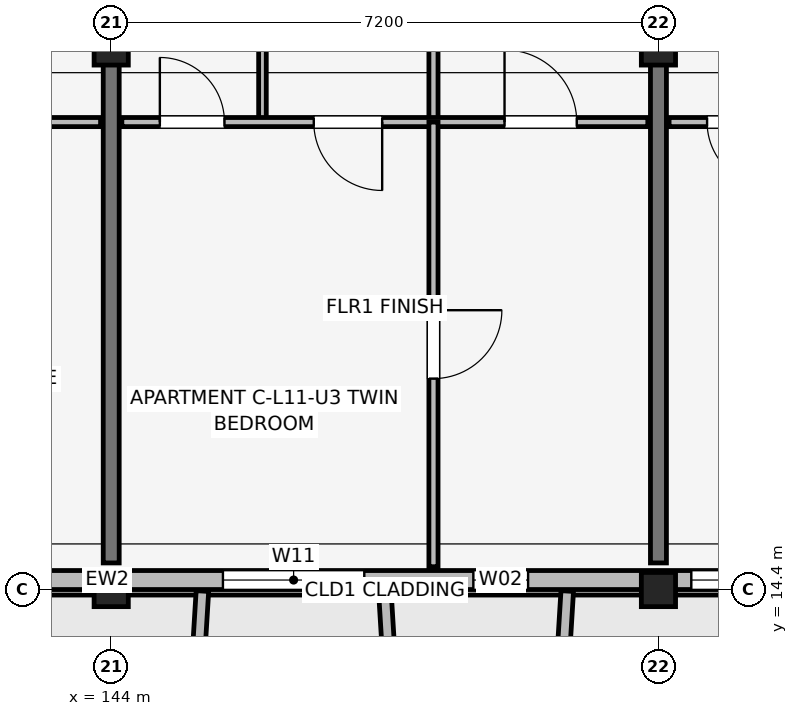
"""IFC4 building model, lengths in metres.
Left out: names, types, materials, properties, quantities, classifications, styles, units other than length and angle.
Written with IfcOpenShell. Run it as: python <this file> out.ifc"""

import sys

from ifc_helpers import new_model, si_unit, direction, frame, frame_2d, origin, origin_2d, place, context, subcontext, project, spatial, rectangle, extrude, element, fill, save


model = new_model("IFC4")
c1 = context("Model", 3, precision=1e-05, world=origin(), true_north=direction((0.0, 1.0)))
c2 = subcontext(c1, "Body", "Model", "MODEL_VIEW")
j1 = project(units=[si_unit("LENGTHUNIT", "METRE"), si_unit("PLANEANGLEUNIT", "RADIAN")], contexts=[c1])
p1 = place(None, origin())
s1 = spatial("IfcSite", under=j1, at=p1, CompositionType="ELEMENT")
p2 = place(p1, origin())
s2 = spatial("IfcBuilding", under=s1, at=p2, CompositionType="ELEMENT")
p3 = place(p2, frame((0.0, 0.0, 37.05)))
s3 = spatial("IfcBuildingStorey", under=s2, at=p3, CompositionType="ELEMENT", Elevation=37.05)
p4 = place(p3, frame((144.0, 14.4, 0.0), z_axis=(0.0, 0.0, 1.0), x_axis=(1.0, 0.0, 0.0)))
e1 = element("IfcColumn", 1, at=p4, inside=s3, PredefinedType="COLUMN", context=c2, shape_type="SweptSolid", body=[
    extrude(rectangle(XDim=0.45, YDim=0.45, at=origin_2d()), origin(), (0.0, 0.0, 1.0), 3.15),
])
p5 = place(p3, frame((144.0, 21.6, 0.0), z_axis=(0.0, 0.0, 1.0), x_axis=(1.0, 0.0, 0.0)))
e2 = element("IfcColumn", 2, at=p5, inside=s3, PredefinedType="COLUMN", context=c2, shape_type="SweptSolid", body=[
    extrude(rectangle(XDim=0.45, YDim=0.6, at=origin_2d()), origin(), (0.0, 0.0, 1.0), 3.15),
])
p6 = place(p3, frame((151.2, 14.4, 0.0), z_axis=(0.0, 0.0, 1.0), x_axis=(1.0, 0.0, 0.0)))
e3 = element("IfcColumn", 3, at=p6, inside=s3, PredefinedType="COLUMN", context=c2, shape_type="SweptSolid", body=[
    extrude(rectangle(XDim=0.45, YDim=0.45, at=origin_2d()), origin(), (0.0, 0.0, 1.0), 3.15),
])
p7 = place(p3, frame((151.2, 21.6, 0.0), z_axis=(0.0, 0.0, 1.0), x_axis=(1.0, 0.0, 0.0)))
e4 = element("IfcColumn", 4, at=p7, inside=s3, PredefinedType="COLUMN", context=c2, shape_type="SweptSolid", body=[
    extrude(rectangle(XDim=0.45, YDim=0.6, at=origin_2d()), origin(), (0.0, 0.0, 1.0), 3.15),
])
for number, where, z_axis, x_axis in (
    (5, (144.0, 14.75, 0.0), (0.0, 0.0, 1.0), (0.0, 1.0, 0.0)),
    (6, (151.2, 14.75, 0.0), (0.0, 0.0, 1.0), (0.0, 1.0, 0.0)),
):
    element("IfcWall", number, at=place(p3, frame(where, z_axis=z_axis, x_axis=x_axis)), inside=s3, PredefinedType="SHEAR", context=c2, shape_type="SweptSolid", body=[
        extrude(rectangle(XDim=9.4, YDim=0.21, at=frame_2d((4.7, 0.0))), origin(), (0.0, 0.0, 1.0), 3.15),
    ])
p8 = place(p3, frame((132.6, 14.525, 0.0), z_axis=(0.0, 0.0, 1.0), x_axis=(1.0, 0.0, 0.0)))
e7 = element("IfcWall", 7, at=p8, inside=s3, PredefinedType="SOLIDWALL", context=c2, shape_type="SweptSolid", body=[
    extrude(rectangle(XDim=30.0, YDim=0.25, at=frame_2d((15.0, 0.0))), origin(), (0.0, 0.0, 1.0), 2.45),
])
p9 = place(p8, frame((9.825, 0.0, 0.0), z_axis=(0.0, 0.0, 1.0), x_axis=(-1.0, 0.0, 0.0)))
e8 = element("IfcOpeningElement", 8, at=p9, cuts=e7, PredefinedType="OPENING", context=c2, shape_type="SweptSolid", body=[
    extrude(rectangle(XDim=1.65, YDim=2.15, at=frame_2d((0.825, 1.075))), frame((0.0, 0.135, 0.0), z_axis=(0.0, -1.0, 0.0), x_axis=(1.0, 0.0, 0.0)), (0.0, 0.0, 1.0), 0.27),
])
p10 = place(p8, frame((24.15, 0.0, 0.0), z_axis=(0.0, 0.0, 1.0), x_axis=(-1.0, 0.0, 0.0)))
e9 = element("IfcOpeningElement", 9, at=p10, cuts=e7, PredefinedType="OPENING", context=c2, shape_type="SweptSolid", body=[
    extrude(rectangle(XDim=1.5, YDim=2.15, at=frame_2d((0.75, 1.075))), frame((0.0, 0.135, 0.0), z_axis=(0.0, -1.0, 0.0), x_axis=(1.0, 0.0, 0.0)), (0.0, 0.0, 1.0), 0.27),
])
p11 = place(p8, frame((0.77, 0.0, 0.7)))
e10 = element("IfcOpeningElement", 10, at=p11, cuts=e7, PredefinedType="OPENING", context=c2, shape_type="SweptSolid", body=[
    extrude(rectangle(XDim=1.46, YDim=1.55, at=frame_2d((0.73, 0.775))), frame((0.0, 0.135, 0.0), z_axis=(0.0, -1.0, 0.0), x_axis=(1.0, 0.0, 0.0)), (0.0, 0.0, 1.0), 0.27),
])
p12 = place(p8, frame((3.167, 0.0, 0.75)))
e11 = element("IfcOpeningElement", 11, at=p12, cuts=e7, PredefinedType="OPENING", context=c2, shape_type="SweptSolid", body=[
    extrude(rectangle(XDim=0.6, YDim=1.25, at=frame_2d((0.3, 0.625))), frame((0.0, 0.135, 0.0), z_axis=(0.0, -1.0, 0.0), x_axis=(1.0, 0.0, 0.0)), (0.0, 0.0, 1.0), 0.27),
])
p13 = place(p8, frame((4.633, 0.0, 0.75)))
e12 = element("IfcOpeningElement", 12, at=p13, cuts=e7, PredefinedType="OPENING", context=c2, shape_type="SweptSolid", body=[
    extrude(rectangle(XDim=0.6, YDim=1.25, at=frame_2d((0.3, 0.625))), frame((0.0, 0.135, 0.0), z_axis=(0.0, -1.0, 0.0), x_axis=(1.0, 0.0, 0.0)), (0.0, 0.0, 1.0), 0.27),
])
p14 = place(p8, frame((12.87, 0.0, 0.7)))
e13 = element("IfcOpeningElement", 13, at=p14, cuts=e7, PredefinedType="OPENING", context=c2, shape_type="SweptSolid", body=[
    extrude(rectangle(XDim=1.86, YDim=1.6, at=frame_2d((0.93, 0.8))), frame((0.0, 0.135, 0.0), z_axis=(0.0, -1.0, 0.0), x_axis=(1.0, 0.0, 0.0)), (0.0, 0.0, 1.0), 0.27),
])
p15 = place(p8, frame((16.165, 0.0, 0.75)))
e14 = element("IfcOpeningElement", 14, at=p15, cuts=e7, PredefinedType="OPENING", context=c2, shape_type="SweptSolid", body=[
    extrude(rectangle(XDim=0.72, YDim=1.35, at=frame_2d((0.36, 0.675))), frame((0.0, 0.135, 0.0), z_axis=(0.0, -1.0, 0.0), x_axis=(1.0, 0.0, 0.0)), (0.0, 0.0, 1.0), 0.27),
])
p16 = place(p8, frame((19.032, 0.0, 0.75)))
e15 = element("IfcOpeningElement", 15, at=p16, cuts=e7, PredefinedType="OPENING", context=c2, shape_type="SweptSolid", body=[
    extrude(rectangle(XDim=0.6, YDim=1.25, at=frame_2d((0.3, 0.625))), frame((0.0, 0.135, 0.0), z_axis=(0.0, -1.0, 0.0), x_axis=(1.0, 0.0, 0.0)), (0.0, 0.0, 1.0), 0.27),
])
p17 = place(p8, frame((26.232, 0.0, 0.75)))
e16 = element("IfcOpeningElement", 16, at=p17, cuts=e7, PredefinedType="OPENING", context=c2, shape_type="SweptSolid", body=[
    extrude(rectangle(XDim=0.6, YDim=1.25, at=frame_2d((0.3, 0.625))), frame((0.0, 0.135, 0.0), z_axis=(0.0, -1.0, 0.0), x_axis=(1.0, 0.0, 0.0)), (0.0, 0.0, 1.0), 0.27),
])
p18 = place(p8, frame((28.05, 0.0, 0.75)))
e17 = element("IfcOpeningElement", 17, at=p18, cuts=e7, PredefinedType="OPENING", context=c2, shape_type="SweptSolid", body=[
    extrude(rectangle(XDim=1.1, YDim=1.5, at=frame_2d((0.55, 0.75))), frame((0.0, 0.135, 0.0), z_axis=(0.0, -1.0, 0.0), x_axis=(1.0, 0.0, 0.0)), (0.0, 0.0, 1.0), 0.27),
])
for number, where, z_axis, x_axis in (
    (18, (145.2, 14.38, 0.0), (0.0, 0.0, 1.0), (-0.061, -0.998, 0.0)),
    (19, (147.6, 14.38, 0.0), (0.0, 0.0, 1.0), (0.061, -0.998, 0.0)),
    (20, (150.0, 14.38, 0.0), (0.0, 0.0, 1.0), (-0.061, -0.998, 0.0)),
):
    element("IfcWall", number, at=place(p3, frame(where, z_axis=z_axis, x_axis=x_axis)), inside=s3, PredefinedType="ELEMENTEDWALL", context=c2, shape_type="SweptSolid", body=[
        extrude(rectangle(XDim=1.964, YDim=0.165, at=frame_2d((0.982, 0.0))), origin(), (0.0, 0.0, 1.0), 2.45),
    ])
p19 = place(p3, frame((136.94, 20.55, 0.0), z_axis=(0.0, 0.0, 1.0), x_axis=(1.0, 0.0, 0.0)))
e21 = element("IfcWall", 21, at=p19, inside=s3, PredefinedType="PARTITIONING", context=c2, shape_type="SweptSolid", body=[
    extrude(rectangle(XDim=6.92, YDim=0.12, at=frame_2d((3.46, 0.0))), origin(), (0.0, 0.0, 1.0), 2.38),
])
p20 = place(p19, frame((1.35, 0.0, 0.0), z_axis=(0.0, 0.0, 1.0), x_axis=(-1.0, 0.0, 0.0)))
e22 = element("IfcOpeningElement", 22, at=p20, cuts=e21, PredefinedType="OPENING", context=c2, shape_type="SweptSolid", body=[
    extrude(rectangle(XDim=0.85, YDim=2.08, at=frame_2d((0.425, 1.04))), frame((0.0, 0.07, 0.0), z_axis=(0.0, -1.0, 0.0), x_axis=(1.0, 0.0, 0.0)), (0.0, 0.0, 1.0), 0.14),
])
p21 = place(p19, frame((2.375, 0.0, 0.0)))
e23 = element("IfcOpeningElement", 23, at=p21, cuts=e21, PredefinedType="OPENING", context=c2, shape_type="SweptSolid", body=[
    extrude(rectangle(XDim=0.9, YDim=2.08, at=frame_2d((0.45, 1.04))), frame((0.0, 0.07, 0.0), z_axis=(0.0, -1.0, 0.0), x_axis=(1.0, 0.0, 0.0)), (0.0, 0.0, 1.0), 0.14),
])
p22 = place(p19, frame((5.835, 0.0, 0.0), z_axis=(0.0, 0.0, 1.0), x_axis=(-1.0, 0.0, 0.0)))
e24 = element("IfcOpeningElement", 24, at=p22, cuts=e21, PredefinedType="OPENING", context=c2, shape_type="SweptSolid", body=[
    extrude(rectangle(XDim=0.95, YDim=2.08, at=frame_2d((0.475, 1.04))), frame((0.0, 0.07, 0.0), z_axis=(0.0, -1.0, 0.0), x_axis=(1.0, 0.0, 0.0)), (0.0, 0.0, 1.0), 0.14),
])
p23 = place(p3, frame((145.99, 20.55, 0.0), z_axis=(0.0, 0.0, 1.0), x_axis=(0.0, 1.0, 0.0)))
e25 = element("IfcWall", 25, at=p23, inside=s3, PredefinedType="PARTITIONING", context=c2, shape_type="SweptSolid", body=[
    extrude(rectangle(XDim=3.75, YDim=0.1, at=frame_2d((1.875, 0.0))), origin(), (0.0, 0.0, 1.0), 2.38),
])
p24 = place(p3, frame((148.24, 20.55, 0.0), z_axis=(0.0, 0.0, 1.0), x_axis=(0.0, 1.0, 0.0)))
e26 = element("IfcWall", 26, at=p24, inside=s3, PredefinedType="PARTITIONING", context=c2, shape_type="SweptSolid", body=[
    extrude(rectangle(XDim=3.75, YDim=0.12, at=frame_2d((1.875, 0.0))), origin(), (0.0, 0.0, 1.0), 2.38),
])
p25 = place(p3, frame((144.14, 20.55, 0.0), z_axis=(0.0, 0.0, 1.0), x_axis=(1.0, 0.0, 0.0)))
e27 = element("IfcWall", 27, at=p25, inside=s3, PredefinedType="PARTITIONING", context=c2, shape_type="SweptSolid", body=[
    extrude(rectangle(XDim=6.92, YDim=0.12, at=frame_2d((3.46, 0.0))), origin(), (0.0, 0.0, 1.0), 2.38),
])
p26 = place(p25, frame((0.5, 0.0, 0.0)))
e28 = element("IfcOpeningElement", 28, at=p26, cuts=e27, PredefinedType="OPENING", context=c2, shape_type="SweptSolid", body=[
    extrude(rectangle(XDim=0.85, YDim=2.08, at=frame_2d((0.425, 1.04))), frame((0.0, 0.07, 0.0), z_axis=(0.0, -1.0, 0.0), x_axis=(1.0, 0.0, 0.0)), (0.0, 0.0, 1.0), 0.14),
])
p27 = place(p25, frame((3.425, 0.0, 0.0), z_axis=(0.0, 0.0, 1.0), x_axis=(-1.0, 0.0, 0.0)))
e29 = element("IfcOpeningElement", 29, at=p27, cuts=e27, PredefinedType="OPENING", context=c2, shape_type="SweptSolid", body=[
    extrude(rectangle(XDim=0.9, YDim=2.08, at=frame_2d((0.45, 1.04))), frame((0.0, 0.07, 0.0), z_axis=(0.0, -1.0, 0.0), x_axis=(1.0, 0.0, 0.0)), (0.0, 0.0, 1.0), 0.14),
])
p28 = place(p25, frame((5.035, 0.0, 0.0)))
e30 = element("IfcOpeningElement", 30, at=p28, cuts=e27, PredefinedType="OPENING", context=c2, shape_type="SweptSolid", body=[
    extrude(rectangle(XDim=0.95, YDim=2.08, at=frame_2d((0.475, 1.04))), frame((0.0, 0.07, 0.0), z_axis=(0.0, -1.0, 0.0), x_axis=(1.0, 0.0, 0.0)), (0.0, 0.0, 1.0), 0.14),
])
p29 = place(p3, frame((148.24, 14.7, 0.0), z_axis=(0.0, 0.0, 1.0), x_axis=(0.0, 1.0, 0.0)))
e31 = element("IfcWall", 31, at=p29, inside=s3, PredefinedType="PARTITIONING", context=c2, shape_type="SweptSolid", body=[
    extrude(rectangle(XDim=5.85, YDim=0.12, at=frame_2d((2.925, 0.0))), origin(), (0.0, 0.0, 1.0), 2.38),
])
p30 = place(p29, frame((3.375, 0.0, 0.0), z_axis=(0.0, 0.0, 1.0), x_axis=(-1.0, 0.0, 0.0)))
e32 = element("IfcOpeningElement", 32, at=p30, cuts=e31, PredefinedType="OPENING", context=c2, shape_type="SweptSolid", body=[
    extrude(rectangle(XDim=0.9, YDim=2.08, at=frame_2d((0.45, 1.04))), frame((0.0, 0.07, 0.0), z_axis=(0.0, -1.0, 0.0), x_axis=(1.0, 0.0, 0.0)), (0.0, 0.0, 1.0), 0.14),
])
p31 = place(p3, frame((151.34, 20.55, 0.0), z_axis=(0.0, 0.0, 1.0), x_axis=(1.0, 0.0, 0.0)))
e33 = element("IfcWall", 33, at=p31, inside=s3, PredefinedType="PARTITIONING", context=c2, shape_type="SweptSolid", body=[
    extrude(rectangle(XDim=6.92, YDim=0.12, at=frame_2d((3.46, 0.0))), origin(), (0.0, 0.0, 1.0), 2.38),
])
p32 = place(p31, frame((1.35, 0.0, 0.0), z_axis=(0.0, 0.0, 1.0), x_axis=(-1.0, 0.0, 0.0)))
e34 = element("IfcOpeningElement", 34, at=p32, cuts=e33, PredefinedType="OPENING", context=c2, shape_type="SweptSolid", body=[
    extrude(rectangle(XDim=0.85, YDim=2.08, at=frame_2d((0.425, 1.04))), frame((0.0, 0.07, 0.0), z_axis=(0.0, -1.0, 0.0), x_axis=(1.0, 0.0, 0.0)), (0.0, 0.0, 1.0), 0.14),
])
p33 = place(p31, frame((2.375, 0.0, 0.0)))
e35 = element("IfcOpeningElement", 35, at=p33, cuts=e33, PredefinedType="OPENING", context=c2, shape_type="SweptSolid", body=[
    extrude(rectangle(XDim=0.9, YDim=2.08, at=frame_2d((0.45, 1.04))), frame((0.0, 0.07, 0.0), z_axis=(0.0, -1.0, 0.0), x_axis=(1.0, 0.0, 0.0)), (0.0, 0.0, 1.0), 0.14),
])
p34 = place(p31, frame((5.835, 0.0, 0.0), z_axis=(0.0, 0.0, 1.0), x_axis=(-1.0, 0.0, 0.0)))
e36 = element("IfcOpeningElement", 36, at=p34, cuts=e33, PredefinedType="OPENING", context=c2, shape_type="SweptSolid", body=[
    extrude(rectangle(XDim=0.95, YDim=2.08, at=frame_2d((0.475, 1.04))), frame((0.0, 0.07, 0.0), z_axis=(0.0, -1.0, 0.0), x_axis=(1.0, 0.0, 0.0)), (0.0, 0.0, 1.0), 0.14),
])
p35 = place(p14, origin())
e37 = element("IfcWindow", 37, at=p35, inside=s3, PartitioningType="SINGLE_PANEL", PredefinedType="WINDOW", context=c2, shape_type="SweptSolid", body=[
    extrude(rectangle(XDim=1.86, YDim=1.6, at=frame_2d((0.93, 0.8))), frame((0.0, 0.03, 0.0), z_axis=(0.0, -1.0, 0.0), x_axis=(1.0, 0.0, 0.0)), (0.0, 0.0, 1.0), 0.06),
])
fill(e13, e37)
p36 = place(p15, origin())
e38 = element("IfcWindow", 38, at=p36, inside=s3, PartitioningType="SINGLE_PANEL", PredefinedType="WINDOW", context=c2, shape_type="SweptSolid", body=[
    extrude(rectangle(XDim=0.72, YDim=1.35, at=frame_2d((0.36, 0.675))), frame((0.0, 0.03, 0.0), z_axis=(0.0, -1.0, 0.0), x_axis=(1.0, 0.0, 0.0)), (0.0, 0.0, 1.0), 0.06),
])
fill(e14, e38)
p37 = place(p16, origin())
e39 = element("IfcWindow", 39, at=p37, inside=s3, PartitioningType="SINGLE_PANEL", PredefinedType="WINDOW", context=c2, shape_type="SweptSolid", body=[
    extrude(rectangle(XDim=0.6, YDim=1.25, at=frame_2d((0.3, 0.625))), frame((0.0, 0.03, 0.0), z_axis=(0.0, -1.0, 0.0), x_axis=(1.0, 0.0, 0.0)), (0.0, 0.0, 1.0), 0.06),
])
fill(e15, e39)
p38 = place(p26, origin())
e40 = element("IfcDoor", 40, at=p38, inside=s3, OperationType="SINGLE_SWING_LEFT", PredefinedType="DOOR", context=c2, shape_type="SweptSolid", body=[
    extrude(rectangle(XDim=0.85, YDim=2.08, at=frame_2d((0.425, 1.04))), frame((0.0, 0.025, 0.0), z_axis=(0.0, -1.0, 0.0), x_axis=(1.0, 0.0, 0.0)), (0.0, 0.0, 1.0), 0.05),
])
fill(e28, e40)
p39 = place(p27, origin())
e41 = element("IfcDoor", 41, at=p39, inside=s3, OperationType="SINGLE_SWING_RIGHT", PredefinedType="DOOR", context=c2, shape_type="SweptSolid", body=[
    extrude(rectangle(XDim=0.9, YDim=2.08, at=frame_2d((0.45, 1.04))), frame((0.0, 0.025, 0.0), z_axis=(0.0, -1.0, 0.0), x_axis=(1.0, 0.0, 0.0)), (0.0, 0.0, 1.0), 0.05),
])
fill(e29, e41)
p40 = place(p28, origin())
e42 = element("IfcDoor", 42, at=p40, inside=s3, OperationType="SINGLE_SWING_LEFT", PredefinedType="DOOR", context=c2, shape_type="SweptSolid", body=[
    extrude(rectangle(XDim=0.95, YDim=2.08, at=frame_2d((0.475, 1.04))), frame((0.0, 0.025, 0.0), z_axis=(0.0, -1.0, 0.0), x_axis=(1.0, 0.0, 0.0)), (0.0, 0.0, 1.0), 0.05),
])
fill(e30, e42)
p41 = place(p30, origin())
e43 = element("IfcDoor", 43, at=p41, inside=s3, OperationType="SINGLE_SWING_RIGHT", PredefinedType="DOOR", context=c2, shape_type="SweptSolid", body=[
    extrude(rectangle(XDim=0.9, YDim=2.08, at=frame_2d((0.45, 1.04))), frame((0.0, 0.025, 0.0), z_axis=(0.0, -1.0, 0.0), x_axis=(1.0, 0.0, 0.0)), (0.0, 0.0, 1.0), 0.05),
])
fill(e32, e43)
p42 = place(p32, origin())
e44 = element("IfcDoor", 44, at=p42, inside=s3, OperationType="SINGLE_SWING_RIGHT", PredefinedType="DOOR", context=c2, shape_type="SweptSolid", body=[
    extrude(rectangle(XDim=0.85, YDim=2.08, at=frame_2d((0.425, 1.04))), frame((0.0, 0.025, 0.0), z_axis=(0.0, -1.0, 0.0), x_axis=(1.0, 0.0, 0.0)), (0.0, 0.0, 1.0), 0.05),
])
fill(e34, e44)
save(model, sys.argv[1])
